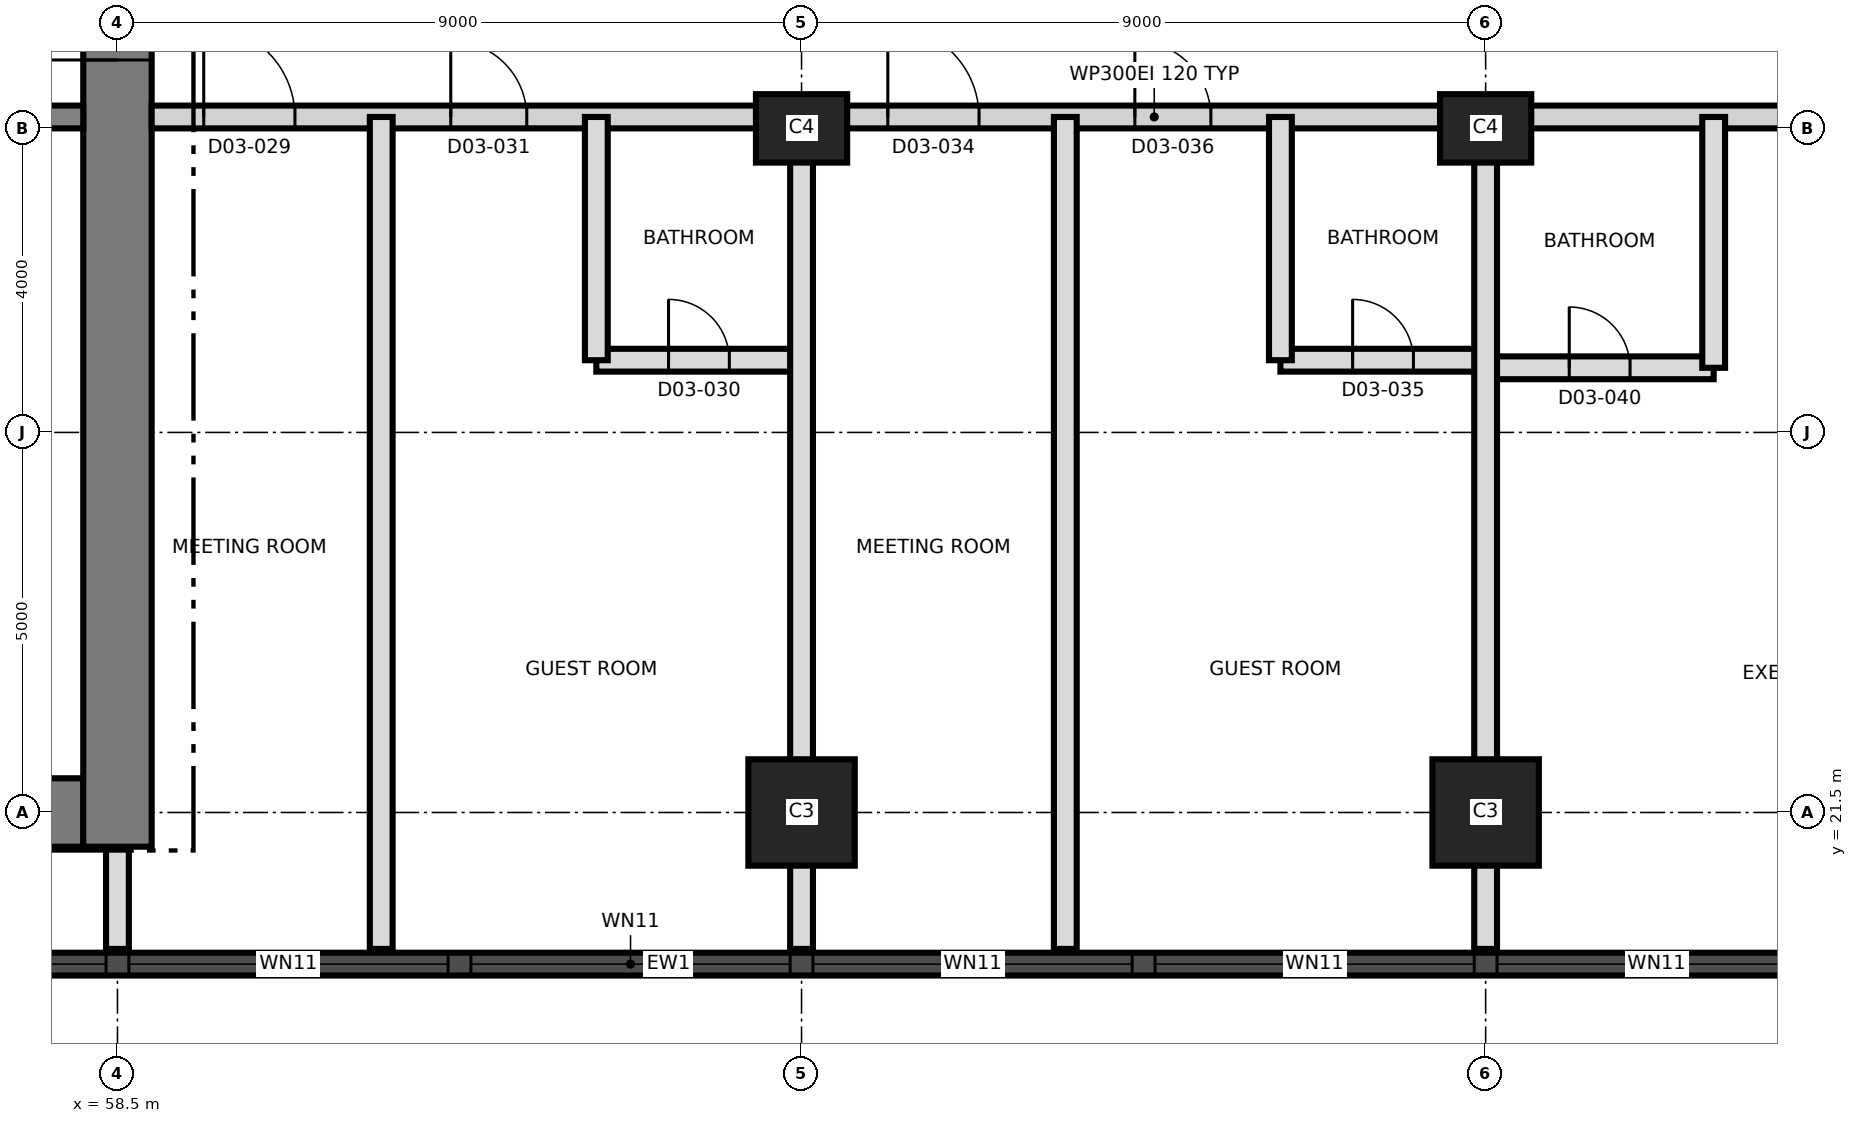
"""IFC4 building model, lengths in metres.
Left out: names, types, materials, properties, quantities, classifications, styles, units other than length and angle.
Written with IfcOpenShell. Run it as: python <this file> out.ifc"""

import sys

from ifc_helpers import new_model, si_unit, direction, frame, frame_2d, origin, origin_2d, place, context, subcontext, project, spatial, rectangle, extrude, element, fill, save


model = new_model("IFC4")
c1 = context("Model", 3, precision=1e-05, world=origin(), true_north=direction((0.0, 1.0)))
c2 = subcontext(c1, "Body", "Model", "MODEL_VIEW")
j1 = project(units=[si_unit("LENGTHUNIT", "METRE"), si_unit("PLANEANGLEUNIT", "RADIAN")], contexts=[c1])
p1 = place(None, origin())
s1 = spatial("IfcSite", under=j1, at=p1, CompositionType="ELEMENT")
p2 = place(p1, origin())
s2 = spatial("IfcBuilding", under=s1, at=p2, CompositionType="ELEMENT")
p3 = place(p2, frame((0.0, 0.0, 59.4)))
s3 = spatial("IfcBuildingStorey", under=s2, at=p3, CompositionType="ELEMENT", Elevation=59.4)
p4 = place(p3, frame((31.05, 21.5, 0.0), z_axis=(0.0, 0.0, 1.0), x_axis=(1.0, 0.0, 0.0)))
e1 = element("IfcWall", 1, at=p4, inside=s3, PredefinedType="SHEAR", context=c2, shape_type="SweptSolid", body=[
    extrude(rectangle(XDim=27.0, YDim=0.9, at=frame_2d((13.5, 0.0))), origin(), (0.0, 0.0, 1.0), 3.7),
])
p5 = place(p3, frame((58.5, 21.05, 0.0), z_axis=(0.0, 0.0, 1.0), x_axis=(0.0, 1.0, 0.0)))
e2 = element("IfcWall", 2, at=p5, inside=s3, PredefinedType="SHEAR", context=c2, shape_type="SweptSolid", body=[
    extrude(rectangle(XDim=18.9, YDim=0.9, at=frame_2d((9.45, 0.0))), origin(), (0.0, 0.0, 1.0), 3.7),
])
p6 = place(p5, frame((10.35, 0.0, 0.0)))
e3 = element("IfcOpeningElement", 3, at=p6, cuts=e2, PredefinedType="OPENING", context=c2, shape_type="SweptSolid", body=[
    extrude(rectangle(XDim=1.2, YDim=2.1, at=frame_2d((0.6, 1.05))), frame((0.0, 0.46, 0.0), z_axis=(0.0, -1.0, 0.0), x_axis=(1.0, 0.0, 0.0)), (0.0, 0.0, 1.0), 0.92),
])
p7 = place(p3, frame((31.95, 30.65, 0.0), z_axis=(0.0, 0.0, 1.0), x_axis=(1.0, 0.0, 0.0)))
e4 = element("IfcWall", 4, at=p7, inside=s3, PredefinedType="SHEAR", context=c2, shape_type="SweptSolid", body=[
    extrude(rectangle(XDim=26.1, YDim=0.3, at=frame_2d((13.05, 0.0))), origin(), (0.0, 0.0, 1.0), 3.7),
])
p8 = place(p7, frame((24.55, 0.0, 0.0)))
e5 = element("IfcOpeningElement", 5, at=p8, cuts=e4, PredefinedType="OPENING", context=c2, shape_type="SweptSolid", body=[
    extrude(rectangle(XDim=1.0, YDim=2.1, at=frame_2d((0.5, 1.05))), frame((0.0, 0.16, 0.0), z_axis=(0.0, -1.0, 0.0), x_axis=(1.0, 0.0, 0.0)), (0.0, 0.0, 1.0), 0.32),
])
p9 = place(p7, frame((11.35, 0.0, 0.0)))
e6 = element("IfcOpeningElement", 6, at=p9, cuts=e4, PredefinedType="OPENING", context=c2, shape_type="SweptSolid", body=[
    extrude(rectangle(XDim=1.0, YDim=2.1, at=frame_2d((0.5, 1.05))), frame((0.0, 0.16, 0.0), z_axis=(0.0, -1.0, 0.0), x_axis=(1.0, 0.0, 0.0)), (0.0, 0.0, 1.0), 0.32),
])
for number, where, z_axis, x_axis in (
    (7, (67.5, 21.5, 0.0), (0.0, 0.0, 1.0), (1.0, 0.0, 0.0)),
    (8, (76.5, 21.5, 0.0), (0.0, 0.0, 1.0), (1.0, 0.0, 0.0)),
):
    element("IfcColumn", number, at=place(p3, frame(where, z_axis=z_axis, x_axis=x_axis)), inside=s3, PredefinedType="COLUMN", context=c2, shape_type="SweptSolid", body=[
        extrude(rectangle(XDim=1.4, YDim=1.4, at=origin_2d()), origin(), (0.0, 0.0, 1.0), 3.7),
    ])
for number, where, z_axis, x_axis in (
    (9, (67.5, 30.5, 0.0), (0.0, 0.0, 1.0), (1.0, 0.0, 0.0)),
    (10, (76.5, 30.5, 0.0), (0.0, 0.0, 1.0), (1.0, 0.0, 0.0)),
):
    element("IfcColumn", number, at=place(p3, frame(where, z_axis=z_axis, x_axis=x_axis)), inside=s3, PredefinedType="COLUMN", context=c2, shape_type="SweptSolid", body=[
        extrude(rectangle(XDim=1.2, YDim=0.9, at=origin_2d()), origin(), (0.0, 0.0, 1.0), 3.7),
    ])
p10 = place(p3, frame((44.01, 19.505, 0.0), z_axis=(0.0, 0.0, 1.0), x_axis=(1.0, 0.0, 0.0)))
e11 = element("IfcWall", 11, at=p10, inside=s3, PredefinedType="SOLIDWALL", context=c2, shape_type="SweptSolid", body=[
    extrude(rectangle(XDim=43.478, YDim=0.3, at=frame_2d((21.739, 0.0))), origin(), (0.0, 0.0, 1.0), 3.4),
])
p11 = place(p10, frame((1.845, 0.0, 0.3)))
e12 = element("IfcOpeningElement", 12, at=p11, cuts=e11, PredefinedType="OPENING", context=c2, shape_type="SweptSolid", body=[
    extrude(rectangle(XDim=1.8, YDim=2.4, at=frame_2d((0.9, 1.2))), frame((0.0, 0.16, 0.0), z_axis=(0.0, -1.0, 0.0), x_axis=(1.0, 0.0, 0.0)), (0.0, 0.0, 1.0), 0.32),
])
p12 = place(p10, frame((5.64, 0.0, 0.9)))
e13 = element("IfcOpeningElement", 13, at=p12, cuts=e11, PredefinedType="OPENING", context=c2, shape_type="SweptSolid", body=[
    extrude(rectangle(XDim=4.2, YDim=1.5, at=frame_2d((2.1, 0.75))), frame((0.0, 0.16, 0.0), z_axis=(0.0, -1.0, 0.0), x_axis=(1.0, 0.0, 0.0)), (0.0, 0.0, 1.0), 0.32),
])
p13 = place(p10, frame((10.14, 0.0, 0.9)))
e14 = element("IfcOpeningElement", 14, at=p13, cuts=e11, PredefinedType="OPENING", context=c2, shape_type="SweptSolid", body=[
    extrude(rectangle(XDim=4.2, YDim=1.5, at=frame_2d((2.1, 0.75))), frame((0.0, 0.16, 0.0), z_axis=(0.0, -1.0, 0.0), x_axis=(1.0, 0.0, 0.0)), (0.0, 0.0, 1.0), 0.32),
])
p14 = place(p10, frame((14.64, 0.0, 0.9)))
e15 = element("IfcOpeningElement", 15, at=p14, cuts=e11, PredefinedType="OPENING", context=c2, shape_type="SweptSolid", body=[
    extrude(rectangle(XDim=4.2, YDim=1.5, at=frame_2d((2.1, 0.75))), frame((0.0, 0.16, 0.0), z_axis=(0.0, -1.0, 0.0), x_axis=(1.0, 0.0, 0.0)), (0.0, 0.0, 1.0), 0.32),
])
p15 = place(p10, frame((19.14, 0.0, 0.9)))
e16 = element("IfcOpeningElement", 16, at=p15, cuts=e11, PredefinedType="OPENING", context=c2, shape_type="SweptSolid", body=[
    extrude(rectangle(XDim=4.2, YDim=1.5, at=frame_2d((2.1, 0.75))), frame((0.0, 0.16, 0.0), z_axis=(0.0, -1.0, 0.0), x_axis=(1.0, 0.0, 0.0)), (0.0, 0.0, 1.0), 0.32),
])
p16 = place(p10, frame((23.64, 0.0, 0.9)))
e17 = element("IfcOpeningElement", 17, at=p16, cuts=e11, PredefinedType="OPENING", context=c2, shape_type="SweptSolid", body=[
    extrude(rectangle(XDim=4.2, YDim=1.5, at=frame_2d((2.1, 0.75))), frame((0.0, 0.16, 0.0), z_axis=(0.0, -1.0, 0.0), x_axis=(1.0, 0.0, 0.0)), (0.0, 0.0, 1.0), 0.32),
])
p17 = place(p10, frame((28.14, 0.0, 0.9)))
e18 = element("IfcOpeningElement", 18, at=p17, cuts=e11, PredefinedType="OPENING", context=c2, shape_type="SweptSolid", body=[
    extrude(rectangle(XDim=4.2, YDim=1.5, at=frame_2d((2.1, 0.75))), frame((0.0, 0.16, 0.0), z_axis=(0.0, -1.0, 0.0), x_axis=(1.0, 0.0, 0.0)), (0.0, 0.0, 1.0), 0.32),
])
p18 = place(p10, frame((32.64, 0.0, 0.9)))
e19 = element("IfcOpeningElement", 19, at=p18, cuts=e11, PredefinedType="OPENING", context=c2, shape_type="SweptSolid", body=[
    extrude(rectangle(XDim=4.2, YDim=1.5, at=frame_2d((2.1, 0.75))), frame((0.0, 0.16, 0.0), z_axis=(0.0, -1.0, 0.0), x_axis=(1.0, 0.0, 0.0)), (0.0, 0.0, 1.0), 0.32),
])
p19 = place(p10, frame((37.14, 0.0, 0.9)))
e20 = element("IfcOpeningElement", 20, at=p19, cuts=e11, PredefinedType="OPENING", context=c2, shape_type="SweptSolid", body=[
    extrude(rectangle(XDim=4.2, YDim=1.5, at=frame_2d((2.1, 0.75))), frame((0.0, 0.16, 0.0), z_axis=(0.0, -1.0, 0.0), x_axis=(1.0, 0.0, 0.0)), (0.0, 0.0, 1.0), 0.32),
])
p20 = place(p3, frame((76.5, 27.35, 0.0), z_axis=(0.0, 0.0, 1.0), x_axis=(1.0, 0.0, 0.0)))
e21 = element("IfcWall", 21, at=p20, inside=s3, PredefinedType="PARTITIONING", context=c2, shape_type="SweptSolid", body=[
    extrude(rectangle(XDim=3.0, YDim=0.3, at=frame_2d((1.5, 0.0))), origin(), (0.0, 0.0, 1.0), 3.4),
])
p21 = place(p20, frame((1.1, 0.0, 0.0)))
e22 = element("IfcOpeningElement", 22, at=p21, cuts=e21, PredefinedType="OPENING", context=c2, shape_type="SweptSolid", body=[
    extrude(rectangle(XDim=0.8, YDim=2.1, at=frame_2d((0.4, 1.05))), frame((0.0, 0.16, 0.0), z_axis=(0.0, -1.0, 0.0), x_axis=(1.0, 0.0, 0.0)), (0.0, 0.0, 1.0), 0.32),
])
p22 = place(p3, frame((64.8, 27.45, 0.0), z_axis=(0.0, 0.0, 1.0), x_axis=(1.0, 0.0, 0.0)))
e23 = element("IfcWall", 23, at=p22, inside=s3, PredefinedType="PARTITIONING", context=c2, shape_type="SweptSolid", body=[
    extrude(rectangle(XDim=2.7, YDim=0.3, at=frame_2d((1.35, 0.0))), origin(), (0.0, 0.0, 1.0), 3.4),
])
p23 = place(p22, frame((0.95, 0.0, 0.0)))
e24 = element("IfcOpeningElement", 24, at=p23, cuts=e23, PredefinedType="OPENING", context=c2, shape_type="SweptSolid", body=[
    extrude(rectangle(XDim=0.8, YDim=2.1, at=frame_2d((0.4, 1.05))), frame((0.0, 0.16, 0.0), z_axis=(0.0, -1.0, 0.0), x_axis=(1.0, 0.0, 0.0)), (0.0, 0.0, 1.0), 0.32),
])
p24 = place(p3, frame((73.8, 27.45, 0.0), z_axis=(0.0, 0.0, 1.0), x_axis=(1.0, 0.0, 0.0)))
e25 = element("IfcWall", 25, at=p24, inside=s3, PredefinedType="PARTITIONING", context=c2, shape_type="SweptSolid", body=[
    extrude(rectangle(XDim=2.7, YDim=0.3, at=frame_2d((1.35, 0.0))), origin(), (0.0, 0.0, 1.0), 3.4),
])
p25 = place(p24, frame((0.95, 0.0, 0.0)))
e26 = element("IfcOpeningElement", 26, at=p25, cuts=e25, PredefinedType="OPENING", context=c2, shape_type="SweptSolid", body=[
    extrude(rectangle(XDim=0.8, YDim=2.1, at=frame_2d((0.4, 1.05))), frame((0.0, 0.16, 0.0), z_axis=(0.0, -1.0, 0.0), x_axis=(1.0, 0.0, 0.0)), (0.0, 0.0, 1.0), 0.32),
])
p26 = place(p3, frame((58.95, 30.65, 0.0), z_axis=(0.0, 0.0, 1.0), x_axis=(1.0, 0.0, 0.0)))
e27 = element("IfcWall", 27, at=p26, inside=s3, PredefinedType="PARTITIONING", context=c2, shape_type="SweptSolid", body=[
    extrude(rectangle(XDim=26.38, YDim=0.3, at=frame_2d((13.19, 0.0))), origin(), (0.0, 0.0, 1.0), 3.4),
])
p27 = place(p26, frame((0.685, 0.0, 0.0)))
e28 = element("IfcOpeningElement", 28, at=p27, cuts=e27, PredefinedType="OPENING", context=c2, shape_type="SweptSolid", body=[
    extrude(rectangle(XDim=1.2, YDim=2.1, at=frame_2d((0.6, 1.05))), frame((0.0, 0.16, 0.0), z_axis=(0.0, -1.0, 0.0), x_axis=(1.0, 0.0, 0.0)), (0.0, 0.0, 1.0), 0.32),
])
p28 = place(p26, frame((3.935, 0.0, 0.0)))
e29 = element("IfcOpeningElement", 29, at=p28, cuts=e27, PredefinedType="OPENING", context=c2, shape_type="SweptSolid", body=[
    extrude(rectangle(XDim=1.0, YDim=2.1, at=frame_2d((0.5, 1.05))), frame((0.0, 0.16, 0.0), z_axis=(0.0, -1.0, 0.0), x_axis=(1.0, 0.0, 0.0)), (0.0, 0.0, 1.0), 0.32),
])
p29 = place(p26, frame((9.685, 0.0, 0.0)))
e30 = element("IfcOpeningElement", 30, at=p29, cuts=e27, PredefinedType="OPENING", context=c2, shape_type="SweptSolid", body=[
    extrude(rectangle(XDim=1.2, YDim=2.1, at=frame_2d((0.6, 1.05))), frame((0.0, 0.16, 0.0), z_axis=(0.0, -1.0, 0.0), x_axis=(1.0, 0.0, 0.0)), (0.0, 0.0, 1.0), 0.32),
])
p30 = place(p26, frame((12.935, 0.0, 0.0)))
e31 = element("IfcOpeningElement", 31, at=p30, cuts=e27, PredefinedType="OPENING", context=c2, shape_type="SweptSolid", body=[
    extrude(rectangle(XDim=1.0, YDim=2.1, at=frame_2d((0.5, 1.05))), frame((0.0, 0.16, 0.0), z_axis=(0.0, -1.0, 0.0), x_axis=(1.0, 0.0, 0.0)), (0.0, 0.0, 1.0), 0.32),
])
p31 = place(p26, frame((21.55, 0.0, 0.0)))
e32 = element("IfcOpeningElement", 32, at=p31, cuts=e27, PredefinedType="OPENING", context=c2, shape_type="SweptSolid", body=[
    extrude(rectangle(XDim=1.0, YDim=2.4, at=frame_2d((0.5, 1.2))), frame((0.0, 0.16, 0.0), z_axis=(0.0, -1.0, 0.0), x_axis=(1.0, 0.0, 0.0)), (0.0, 0.0, 1.0), 0.32),
])
p32 = place(p3, frame((58.5, 19.705, 0.0), z_axis=(0.0, 0.0, 1.0), x_axis=(0.0, 1.0, 0.0)))
e33 = element("IfcWall", 33, at=p32, inside=s3, PredefinedType="PARTITIONING", context=c2, shape_type="SweptSolid", body=[
    extrude(rectangle(XDim=1.325, YDim=0.3, at=frame_2d((0.663, 0.0))), origin(), (0.0, 0.0, 1.0), 3.4),
])
p33 = place(p3, frame((61.97, 19.705, 0.0), z_axis=(0.0, 0.0, 1.0), x_axis=(0.0, 1.0, 0.0)))
e34 = element("IfcWall", 34, at=p33, inside=s3, PredefinedType="PARTITIONING", context=c2, shape_type="SweptSolid", body=[
    extrude(rectangle(XDim=10.945, YDim=0.3, at=frame_2d((5.472, 0.0))), origin(), (0.0, 0.0, 1.0), 3.4),
])
p34 = place(p3, frame((64.8, 27.45, 0.0), z_axis=(0.0, 0.0, 1.0), x_axis=(0.0, 1.0, 0.0)))
e35 = element("IfcWall", 35, at=p34, inside=s3, PredefinedType="PARTITIONING", context=c2, shape_type="SweptSolid", body=[
    extrude(rectangle(XDim=3.2, YDim=0.3, at=frame_2d((1.6, 0.0))), origin(), (0.0, 0.0, 1.0), 3.4),
])
for number, where, z_axis, x_axis in (
    (36, (67.5, 19.705, 0.0), (0.0, 0.0, 1.0), (0.0, 1.0, 0.0)),
    (37, (70.97, 19.705, 0.0), (0.0, 0.0, 1.0), (0.0, 1.0, 0.0)),
):
    element("IfcWall", number, at=place(p3, frame(where, z_axis=z_axis, x_axis=x_axis)), inside=s3, PredefinedType="PARTITIONING", context=c2, shape_type="SweptSolid", body=[
        extrude(rectangle(XDim=10.945, YDim=0.3, at=frame_2d((5.472, 0.0))), origin(), (0.0, 0.0, 1.0), 3.4),
    ])
p35 = place(p3, frame((73.8, 27.45, 0.0), z_axis=(0.0, 0.0, 1.0), x_axis=(0.0, 1.0, 0.0)))
e38 = element("IfcWall", 38, at=p35, inside=s3, PredefinedType="PARTITIONING", context=c2, shape_type="SweptSolid", body=[
    extrude(rectangle(XDim=3.2, YDim=0.3, at=frame_2d((1.6, 0.0))), origin(), (0.0, 0.0, 1.0), 3.4),
])
p36 = place(p3, frame((76.5, 19.705, 0.0), z_axis=(0.0, 0.0, 1.0), x_axis=(0.0, 1.0, 0.0)))
e39 = element("IfcWall", 39, at=p36, inside=s3, PredefinedType="PARTITIONING", context=c2, shape_type="SweptSolid", body=[
    extrude(rectangle(XDim=10.945, YDim=0.3, at=frame_2d((5.472, 0.0))), origin(), (0.0, 0.0, 1.0), 3.4),
])
p37 = place(p3, frame((79.5, 27.35, 0.0), z_axis=(0.0, 0.0, 1.0), x_axis=(0.0, 1.0, 0.0)))
e40 = element("IfcWall", 40, at=p37, inside=s3, PredefinedType="PARTITIONING", context=c2, shape_type="SweptSolid", body=[
    extrude(rectangle(XDim=3.3, YDim=0.3, at=frame_2d((1.65, 0.0))), origin(), (0.0, 0.0, 1.0), 3.4),
])
p38 = place(p13, origin())
e41 = element("IfcWindow", 41, at=p38, inside=s3, PartitioningType="SINGLE_PANEL", PredefinedType="WINDOW", context=c2, shape_type="SweptSolid", body=[
    extrude(rectangle(XDim=4.2, YDim=1.5, at=frame_2d((2.1, 0.75))), frame((0.0, 0.03, 0.0), z_axis=(0.0, -1.0, 0.0), x_axis=(1.0, 0.0, 0.0)), (0.0, 0.0, 1.0), 0.06),
])
fill(e14, e41)
p39 = place(p14, origin())
e42 = element("IfcWindow", 42, at=p39, inside=s3, PartitioningType="SINGLE_PANEL", PredefinedType="WINDOW", context=c2, shape_type="SweptSolid", body=[
    extrude(rectangle(XDim=4.2, YDim=1.5, at=frame_2d((2.1, 0.75))), frame((0.0, 0.03, 0.0), z_axis=(0.0, -1.0, 0.0), x_axis=(1.0, 0.0, 0.0)), (0.0, 0.0, 1.0), 0.06),
])
fill(e15, e42)
p40 = place(p15, origin())
e43 = element("IfcWindow", 43, at=p40, inside=s3, PartitioningType="SINGLE_PANEL", PredefinedType="WINDOW", context=c2, shape_type="SweptSolid", body=[
    extrude(rectangle(XDim=4.2, YDim=1.5, at=frame_2d((2.1, 0.75))), frame((0.0, 0.03, 0.0), z_axis=(0.0, -1.0, 0.0), x_axis=(1.0, 0.0, 0.0)), (0.0, 0.0, 1.0), 0.06),
])
fill(e16, e43)
p41 = place(p16, origin())
e44 = element("IfcWindow", 44, at=p41, inside=s3, PartitioningType="SINGLE_PANEL", PredefinedType="WINDOW", context=c2, shape_type="SweptSolid", body=[
    extrude(rectangle(XDim=4.2, YDim=1.5, at=frame_2d((2.1, 0.75))), frame((0.0, 0.03, 0.0), z_axis=(0.0, -1.0, 0.0), x_axis=(1.0, 0.0, 0.0)), (0.0, 0.0, 1.0), 0.06),
])
fill(e17, e44)
p42 = place(p17, origin())
e45 = element("IfcWindow", 45, at=p42, inside=s3, PartitioningType="SINGLE_PANEL", PredefinedType="WINDOW", context=c2, shape_type="SweptSolid", body=[
    extrude(rectangle(XDim=4.2, YDim=1.5, at=frame_2d((2.1, 0.75))), frame((0.0, 0.03, 0.0), z_axis=(0.0, -1.0, 0.0), x_axis=(1.0, 0.0, 0.0)), (0.0, 0.0, 1.0), 0.06),
])
fill(e18, e45)
p43 = place(p18, origin())
e46 = element("IfcWindow", 46, at=p43, inside=s3, PartitioningType="SINGLE_PANEL", PredefinedType="WINDOW", context=c2, shape_type="SweptSolid", body=[
    extrude(rectangle(XDim=4.2, YDim=1.5, at=frame_2d((2.1, 0.75))), frame((0.0, 0.03, 0.0), z_axis=(0.0, -1.0, 0.0), x_axis=(1.0, 0.0, 0.0)), (0.0, 0.0, 1.0), 0.06),
])
fill(e19, e46)
p44 = place(p6, origin())
e47 = element("IfcDoor", 47, at=p44, inside=s3, OperationType="SINGLE_SWING_LEFT", PredefinedType="DOOR", context=c2, shape_type="SweptSolid", body=[
    extrude(rectangle(XDim=1.2, YDim=2.1, at=frame_2d((0.6, 1.05))), frame((0.0, 0.025, 0.0), z_axis=(0.0, -1.0, 0.0), x_axis=(1.0, 0.0, 0.0)), (0.0, 0.0, 1.0), 0.05),
])
fill(e3, e47)
p45 = place(p27, origin())
e48 = element("IfcDoor", 48, at=p45, inside=s3, OperationType="SINGLE_SWING_LEFT", PredefinedType="DOOR", context=c2, shape_type="SweptSolid", body=[
    extrude(rectangle(XDim=1.2, YDim=2.1, at=frame_2d((0.6, 1.05))), frame((0.0, 0.025, 0.0), z_axis=(0.0, -1.0, 0.0), x_axis=(1.0, 0.0, 0.0)), (0.0, 0.0, 1.0), 0.05),
])
fill(e28, e48)
p46 = place(p23, origin())
e49 = element("IfcDoor", 49, at=p46, inside=s3, OperationType="SINGLE_SWING_RIGHT", PredefinedType="DOOR", context=c2, shape_type="SweptSolid", body=[
    extrude(rectangle(XDim=0.8, YDim=2.1, at=frame_2d((0.4, 1.05))), frame((0.0, 0.025, 0.0), z_axis=(0.0, -1.0, 0.0), x_axis=(1.0, 0.0, 0.0)), (0.0, 0.0, 1.0), 0.05),
])
fill(e24, e49)
p47 = place(p28, origin())
e50 = element("IfcDoor", 50, at=p47, inside=s3, OperationType="SINGLE_SWING_LEFT", PredefinedType="DOOR", context=c2, shape_type="SweptSolid", body=[
    extrude(rectangle(XDim=1.0, YDim=2.1, at=frame_2d((0.5, 1.05))), frame((0.0, 0.025, 0.0), z_axis=(0.0, -1.0, 0.0), x_axis=(1.0, 0.0, 0.0)), (0.0, 0.0, 1.0), 0.05),
])
fill(e29, e50)
p48 = place(p29, origin())
e51 = element("IfcDoor", 51, at=p48, inside=s3, OperationType="SINGLE_SWING_RIGHT", PredefinedType="DOOR", context=c2, shape_type="SweptSolid", body=[
    extrude(rectangle(XDim=1.2, YDim=2.1, at=frame_2d((0.6, 1.05))), frame((0.0, 0.025, 0.0), z_axis=(0.0, -1.0, 0.0), x_axis=(1.0, 0.0, 0.0)), (0.0, 0.0, 1.0), 0.05),
])
fill(e30, e51)
p49 = place(p25, origin())
e52 = element("IfcDoor", 52, at=p49, inside=s3, OperationType="SINGLE_SWING_LEFT", PredefinedType="DOOR", context=c2, shape_type="SweptSolid", body=[
    extrude(rectangle(XDim=0.8, YDim=2.1, at=frame_2d((0.4, 1.05))), frame((0.0, 0.025, 0.0), z_axis=(0.0, -1.0, 0.0), x_axis=(1.0, 0.0, 0.0)), (0.0, 0.0, 1.0), 0.05),
])
fill(e26, e52)
p50 = place(p30, origin())
e53 = element("IfcDoor", 53, at=p50, inside=s3, OperationType="SINGLE_SWING_LEFT", PredefinedType="DOOR", context=c2, shape_type="SweptSolid", body=[
    extrude(rectangle(XDim=1.0, YDim=2.1, at=frame_2d((0.5, 1.05))), frame((0.0, 0.025, 0.0), z_axis=(0.0, -1.0, 0.0), x_axis=(1.0, 0.0, 0.0)), (0.0, 0.0, 1.0), 0.05),
])
fill(e31, e53)
p51 = place(p21, origin())
e54 = element("IfcDoor", 54, at=p51, inside=s3, OperationType="SINGLE_SWING_LEFT", PredefinedType="DOOR", context=c2, shape_type="SweptSolid", body=[
    extrude(rectangle(XDim=0.8, YDim=2.1, at=frame_2d((0.4, 1.05))), frame((0.0, 0.025, 0.0), z_axis=(0.0, -1.0, 0.0), x_axis=(1.0, 0.0, 0.0)), (0.0, 0.0, 1.0), 0.05),
])
fill(e22, e54)
save(model, sys.argv[1])
